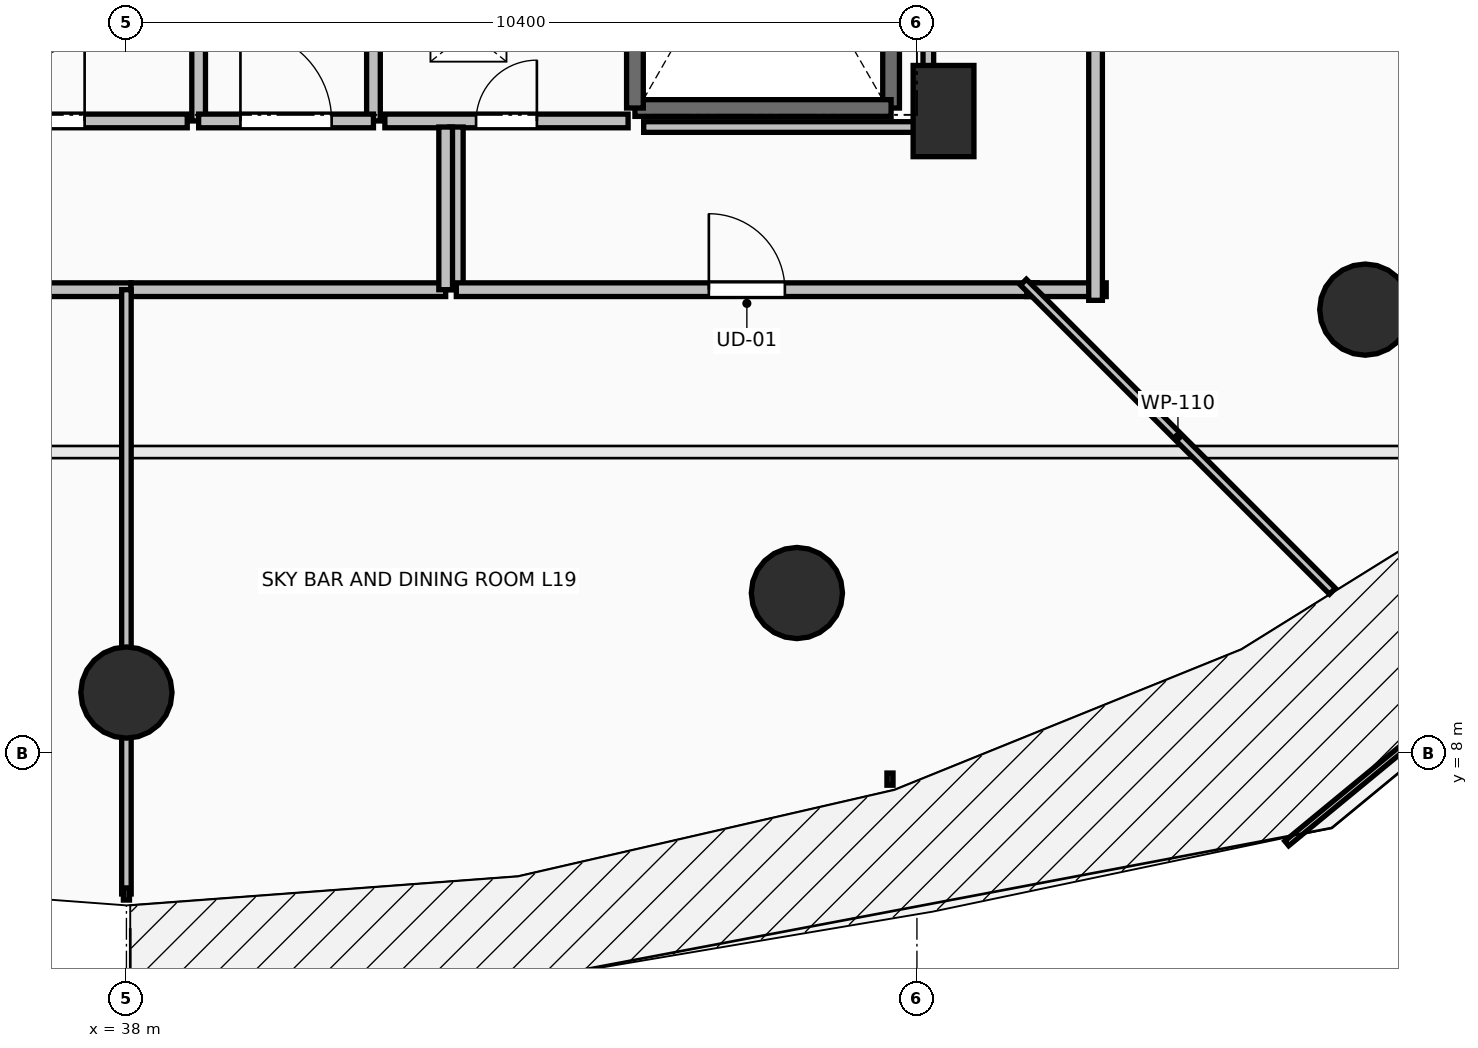
"""IFC4 building model, lengths in metres.
Left out: names, types, materials, properties, quantities, classifications, styles, units other than length and angle.
Written with IfcOpenShell. Run it as: python <this file> out.ifc"""

import sys

from ifc_helpers import new_model, si_unit, direction, frame, frame_2d, origin, origin_2d, place, context, subcontext, project, spatial, rectangle, circle, extrude, element, fill, save


model = new_model("IFC4")
c1 = context("Model", 3, precision=1e-05, world=origin(), true_north=direction((0.0, 1.0)))
c2 = subcontext(c1, "Body", "Model", "MODEL_VIEW")
j1 = project(units=[si_unit("LENGTHUNIT", "METRE"), si_unit("PLANEANGLEUNIT", "RADIAN")], contexts=[c1])
p1 = place(None, origin())
s1 = spatial("IfcSite", under=j1, at=p1, CompositionType="ELEMENT")
p2 = place(p1, origin())
s2 = spatial("IfcBuilding", under=s1, at=p2, CompositionType="ELEMENT")
p3 = place(p2, frame((0.0, 0.0, 74.3)))
s3 = spatial("IfcBuildingStorey", under=s2, at=p3, CompositionType="ELEMENT", Elevation=74.3)
for number, where, z_axis, x_axis in (
    (1, (38.0, 8.8, 0.0), (0.0, 0.0, 1.0), (0.0, -1.0, 0.0)),
    (2, (46.821, 10.109, 0.0), (0.0, 0.0, 1.0), (0.383, -0.924, 0.0)),
    (3, (54.299, 13.838, 0.0), (0.0, 0.0, 1.0), (0.707, -0.707, 0.0)),
):
    element("IfcColumn", number, at=place(p3, frame(where, z_axis=z_axis, x_axis=x_axis)), inside=s3, PredefinedType="COLUMN", context=c2, shape_type="SweptSolid", body=[
        extrude(circle(Radius=0.6, at=origin_2d()), origin(), (0.0, 0.0, 1.0), 4.5),
    ])
p4 = place(p3, frame((48.75, 16.45, 0.0), z_axis=(0.0, 0.0, 1.0), x_axis=(1.0, 0.0, 0.0)))
e4 = element("IfcColumn", 4, at=p4, inside=s3, PredefinedType="PILASTER", context=c2, shape_type="SweptSolid", body=[
    extrude(rectangle(XDim=0.8, YDim=1.2, at=origin_2d()), origin(), (0.0, 0.0, 1.0), 4.5),
])
p5 = place(p3, frame((48.06, 23.91, 0.0), z_axis=(0.0, 0.0, 1.0), x_axis=(0.0, -1.0, 0.0)))
e5 = element("IfcWall", 5, at=p5, inside=s3, PredefinedType="SOLIDWALL", context=c2, shape_type="SweptSolid", body=[
    extrude(rectangle(XDim=7.42, YDim=0.22, at=frame_2d((3.71, 0.0))), origin(), (0.0, 0.0, 1.0), 4.24),
])
p6 = place(p3, frame((48.06, 16.49, 0.0), z_axis=(0.0, 0.0, 1.0), x_axis=(-1.0, 0.0, 0.0)))
e6 = element("IfcWall", 6, at=p6, inside=s3, PredefinedType="SOLIDWALL", context=c2, shape_type="SweptSolid", body=[
    extrude(rectangle(XDim=3.37, YDim=0.22, at=frame_2d((1.685, 0.0))), origin(), (0.0, 0.0, 1.0), 4.24),
])
p7 = place(p3, frame((44.69, 16.49, 0.0), z_axis=(0.0, 0.0, 1.0), x_axis=(0.0, 1.0, 0.0)))
e7 = element("IfcWall", 7, at=p7, inside=s3, PredefinedType="SOLIDWALL", context=c2, shape_type="SweptSolid", body=[
    extrude(rectangle(XDim=7.42, YDim=0.22, at=frame_2d((3.71, 0.0))), origin(), (0.0, 0.0, 1.0), 4.24),
])
p8 = place(p3, frame((41.25, 16.32, 0.0), z_axis=(0.0, 0.0, 1.0), x_axis=(0.0, 1.0, 0.0)))
e8 = element("IfcWall", 8, at=p8, inside=s3, PredefinedType="PARTITIONING", context=c2, shape_type="SweptSolid", body=[
    extrude(rectangle(XDim=3.985, YDim=0.18, at=frame_2d((1.992, 0.0))), origin(), (0.0, 0.0, 1.0), 4.24),
])
p9 = place(p8, frame((1.593, 0.0, 0.0)))
e9 = element("IfcOpeningElement", 9, at=p9, cuts=e8, PredefinedType="OPENING", context=c2, shape_type="SweptSolid", body=[
    extrude(rectangle(XDim=0.8, YDim=2.05, at=frame_2d((0.4, 1.025))), frame((0.0, 0.105, 0.0), z_axis=(0.0, -1.0, 0.0), x_axis=(1.0, 0.0, 0.0)), (0.0, 0.0, 1.0), 0.21),
])
p10 = place(p3, frame((38.95, 21.755, 0.0), z_axis=(0.0, 0.0, 1.0), x_axis=(0.0, -1.0, 0.0)))
e10 = element("IfcWall", 10, at=p10, inside=s3, PredefinedType="PARTITIONING", context=c2, shape_type="SweptSolid", body=[
    extrude(rectangle(XDim=5.435, YDim=0.18, at=frame_2d((2.717, 0.0))), origin(), (0.0, 0.0, 1.0), 4.24),
])
p11 = place(p10, frame((2.218, 0.0, 0.0)))
e11 = element("IfcOpeningElement", 11, at=p11, cuts=e10, PredefinedType="OPENING", context=c2, shape_type="SweptSolid", body=[
    extrude(rectangle(XDim=1.0, YDim=2.15, at=frame_2d((0.5, 1.075))), frame((0.0, 0.105, 0.0), z_axis=(0.0, -1.0, 0.0), x_axis=(1.0, 0.0, 0.0)), (0.0, 0.0, 1.0), 0.21),
])
p12 = place(p3, frame((38.95, 16.32, 0.0), z_axis=(0.0, 0.0, 1.0), x_axis=(1.0, 0.0, 0.0)))
e12 = element("IfcWall", 12, at=p12, inside=s3, PredefinedType="PARTITIONING", context=c2, shape_type="SweptSolid", body=[
    extrude(rectangle(XDim=2.3, YDim=0.18, at=frame_2d((1.15, 0.0))), origin(), (0.0, 0.0, 1.0), 4.24),
])
p13 = place(p12, frame((0.55, 0.0, 0.0)))
e13 = element("IfcOpeningElement", 13, at=p13, cuts=e12, PredefinedType="OPENING", context=c2, shape_type="SweptSolid", body=[
    extrude(rectangle(XDim=1.2, YDim=2.15, at=frame_2d((0.6, 1.075))), frame((0.0, 0.105, 0.0), z_axis=(0.0, -1.0, 0.0), x_axis=(1.0, 0.0, 0.0)), (0.0, 0.0, 1.0), 0.21),
])
p14 = place(p3, frame((41.4, 16.32, 0.0), z_axis=(0.0, 0.0, 1.0), x_axis=(1.0, 0.0, 0.0)))
e14 = element("IfcWall", 14, at=p14, inside=s3, PredefinedType="PARTITIONING", context=c2, shape_type="SweptSolid", body=[
    extrude(rectangle(XDim=3.2, YDim=0.18, at=frame_2d((1.6, 0.0))), origin(), (0.0, 0.0, 1.0), 4.24),
])
p15 = place(p14, frame((1.2, 0.0, 0.0)))
e15 = element("IfcOpeningElement", 15, at=p15, cuts=e14, PredefinedType="OPENING", context=c2, shape_type="SweptSolid", body=[
    extrude(rectangle(XDim=0.8, YDim=2.05, at=frame_2d((0.4, 1.025))), frame((0.0, 0.105, 0.0), z_axis=(0.0, -1.0, 0.0), x_axis=(1.0, 0.0, 0.0)), (0.0, 0.0, 1.0), 0.21),
])
p16 = place(p3, frame((35.1, 16.32, 0.0), z_axis=(0.0, 0.0, 1.0), x_axis=(1.0, 0.0, 0.0)))
e16 = element("IfcWall", 16, at=p16, inside=s3, PredefinedType="PARTITIONING", context=c2, shape_type="SweptSolid", body=[
    extrude(rectangle(XDim=3.7, YDim=0.18, at=frame_2d((1.85, 0.0))), origin(), (0.0, 0.0, 1.0), 4.24),
])
p17 = place(p16, frame((1.35, 0.0, 0.0)))
e17 = element("IfcOpeningElement", 17, at=p17, cuts=e16, PredefinedType="OPENING", context=c2, shape_type="SweptSolid", body=[
    extrude(rectangle(XDim=1.0, YDim=2.15, at=frame_2d((0.5, 1.075))), frame((0.0, 0.105, 0.0), z_axis=(0.0, -1.0, 0.0), x_axis=(1.0, 0.0, 0.0)), (0.0, 0.0, 1.0), 0.21),
])
p18 = place(p3, frame((25.25, 14.1, 0.0), z_axis=(0.0, 0.0, 1.0), x_axis=(1.0, 0.0, 0.0)))
e18 = element("IfcWall", 18, at=p18, inside=s3, PredefinedType="PARTITIONING", context=c2, shape_type="SweptSolid", body=[
    extrude(rectangle(XDim=12.81, YDim=0.18, at=frame_2d((6.405, 0.0))), origin(), (0.0, 0.0, 1.0), 3.432),
])
p19 = place(p18, frame((5.905, 0.0, 0.0)))
e19 = element("IfcOpeningElement", 19, at=p19, cuts=e18, PredefinedType="OPENING", context=c2, shape_type="SweptSolid", body=[
    extrude(rectangle(XDim=1.0, YDim=2.15, at=frame_2d((0.5, 1.075))), frame((0.0, 0.105, 0.0), z_axis=(0.0, -1.0, 0.0), x_axis=(1.0, 0.0, 0.0)), (0.0, 0.0, 1.0), 0.21),
])
p20 = place(p3, frame((42.34, 16.24, 0.0), z_axis=(0.0, 0.0, 1.0), x_axis=(0.0, -1.0, 0.0)))
e20 = element("IfcWall", 20, at=p20, inside=s3, PredefinedType="PARTITIONING", context=c2, shape_type="SweptSolid", body=[
    extrude(rectangle(XDim=2.14, YDim=0.18, at=frame_2d((1.07, 0.0))), origin(), (0.0, 0.0, 1.0), 3.922),
])
p21 = place(p3, frame((42.34, 14.1, 0.0), z_axis=(0.0, 0.0, 1.0), x_axis=(1.0, 0.0, 0.0)))
e21 = element("IfcWall", 21, at=p21, inside=s3, PredefinedType="PARTITIONING", context=c2, shape_type="SweptSolid", body=[
    extrude(rectangle(XDim=7.645, YDim=0.18, at=frame_2d((3.823, 0.0))), origin(), (0.0, 0.0, 1.0), 3.432),
])
p22 = place(p21, frame((3.323, 0.0, 0.0)))
e22 = element("IfcOpeningElement", 22, at=p22, cuts=e21, PredefinedType="OPENING", context=c2, shape_type="SweptSolid", body=[
    extrude(rectangle(XDim=1.0, YDim=2.15, at=frame_2d((0.5, 1.075))), frame((0.0, 0.105, 0.0), z_axis=(0.0, -1.0, 0.0), x_axis=(1.0, 0.0, 0.0)), (0.0, 0.0, 1.0), 0.21),
])
p23 = place(p3, frame((38.06, 14.1, 0.0), z_axis=(0.0, 0.0, 1.0), x_axis=(1.0, 0.0, 0.0)))
e23 = element("IfcWall", 23, at=p23, inside=s3, PredefinedType="PARTITIONING", context=c2, shape_type="SweptSolid", body=[
    extrude(rectangle(XDim=4.14, YDim=0.18, at=frame_2d((2.07, 0.0))), origin(), (0.0, 0.0, 1.0), 3.922),
])
p24 = place(p3, frame((42.2, 14.1, 0.0), z_axis=(0.0, 0.0, 1.0), x_axis=(0.0, 1.0, 0.0)))
e24 = element("IfcWall", 24, at=p24, inside=s3, PredefinedType="PARTITIONING", context=c2, shape_type="SweptSolid", body=[
    extrude(rectangle(XDim=2.14, YDim=0.18, at=frame_2d((1.07, 0.0))), origin(), (0.0, 0.0, 1.0), 3.922),
])
p25 = place(p3, frame((49.845, 14.1, 0.0), z_axis=(0.0, 0.0, 1.0), x_axis=(1.0, 0.0, 0.0)))
e25 = element("IfcWall", 25, at=p25, inside=s3, PredefinedType="PARTITIONING", context=c2, shape_type="SweptSolid", body=[
    extrude(rectangle(XDim=1.045, YDim=0.18, at=frame_2d((0.522, 0.0))), origin(), (0.0, 0.0, 1.0), 3.874),
])
p26 = place(p3, frame((50.75, 13.96, 0.0), z_axis=(0.0, 0.0, 1.0), x_axis=(0.0, 1.0, 0.0)))
e26 = element("IfcWall", 26, at=p26, inside=s3, PredefinedType="PARTITIONING", context=c2, shape_type="SweptSolid", body=[
    extrude(rectangle(XDim=12.12, YDim=0.18, at=frame_2d((6.06, 0.0))), origin(), (0.0, 0.0, 1.0), 3.432),
])
p27 = place(p26, frame((5.56, 0.0, 0.0)))
e27 = element("IfcOpeningElement", 27, at=p27, cuts=e26, PredefinedType="OPENING", context=c2, shape_type="SweptSolid", body=[
    extrude(rectangle(XDim=1.0, YDim=2.15, at=frame_2d((0.5, 1.075))), frame((0.0, 0.105, 0.0), z_axis=(0.0, -1.0, 0.0), x_axis=(1.0, 0.0, 0.0)), (0.0, 0.0, 1.0), 0.21),
])
p28 = place(p3, frame((38.0, 6.15, 0.0), z_axis=(0.0, 0.0, 1.0), x_axis=(0.0, 1.0, 0.0)))
e28 = element("IfcWall", 28, at=p28, inside=s3, PredefinedType="PARTITIONING", context=c2, shape_type="SweptSolid", body=[
    extrude(rectangle(XDim=7.95, YDim=0.125, at=frame_2d((3.975, 0.0))), origin(), (0.0, 0.0, 1.0), 3.874),
])
p29 = place(p3, frame((53.867, 10.133, 0.0), z_axis=(0.0, 0.0, 1.0), x_axis=(-0.707106781187, 0.707106781187, 0.0)))
e29 = element("IfcWall", 29, at=p29, inside=s3, PredefinedType="PARTITIONING", context=c2, shape_type="SweptSolid", body=[
    extrude(rectangle(XDim=5.75, YDim=0.11, at=frame_2d((2.875, 0.0))), origin(), (0.0, 0.0, 1.0), 3.624),
])
p30 = place(p3, frame((48.55, 23.754, 0.0), z_axis=(0.0, 0.0, 1.0), x_axis=(0.0, -1.0, 0.0)))
e30 = element("IfcWall", 30, at=p30, inside=s3, PredefinedType="PARTITIONING", context=c2, shape_type="SweptSolid", body=[
    extrude(rectangle(XDim=7.514, YDim=0.14, at=frame_2d((3.757, 0.0))), origin(), (0.0, 0.0, 1.0), 3.432),
])
p31 = place(p3, frame((48.55, 16.24, 0.0), z_axis=(0.0, 0.0, 1.0), x_axis=(-1.0, 0.0, 0.0)))
e31 = element("IfcWall", 31, at=p31, inside=s3, PredefinedType="PARTITIONING", context=c2, shape_type="SweptSolid", body=[
    extrude(rectangle(XDim=3.745, YDim=0.14, at=frame_2d((1.873, 0.0))), origin(), (0.0, 0.0, 1.0), 3.432),
])
p32 = place(p13, origin())
e32 = element("IfcDoor", 32, at=p32, inside=s3, OperationType="SINGLE_SWING_LEFT", PredefinedType="DOOR", context=c2, shape_type="SweptSolid", body=[
    extrude(rectangle(XDim=1.2, YDim=2.15, at=frame_2d((0.6, 1.075))), frame((0.0, 0.025, 0.0), z_axis=(0.0, -1.0, 0.0), x_axis=(1.0, 0.0, 0.0)), (0.0, 0.0, 1.0), 0.05),
])
fill(e13, e32)
p33 = place(p15, origin())
e33 = element("IfcDoor", 33, at=p33, inside=s3, OperationType="SINGLE_SWING_RIGHT", PredefinedType="DOOR", context=c2, shape_type="SweptSolid", body=[
    extrude(rectangle(XDim=0.8, YDim=2.05, at=frame_2d((0.4, 1.025))), frame((0.0, 0.025, 0.0), z_axis=(0.0, -1.0, 0.0), x_axis=(1.0, 0.0, 0.0)), (0.0, 0.0, 1.0), 0.05),
])
fill(e15, e33)
p34 = place(p17, origin())
e34 = element("IfcDoor", 34, at=p34, inside=s3, OperationType="SINGLE_SWING_RIGHT", PredefinedType="DOOR", context=c2, shape_type="SweptSolid", body=[
    extrude(rectangle(XDim=1.0, YDim=2.15, at=frame_2d((0.5, 1.075))), frame((0.0, 0.025, 0.0), z_axis=(0.0, -1.0, 0.0), x_axis=(1.0, 0.0, 0.0)), (0.0, 0.0, 1.0), 0.05),
])
fill(e17, e34)
p35 = place(p22, origin())
e35 = element("IfcDoor", 35, at=p35, inside=s3, OperationType="SINGLE_SWING_LEFT", PredefinedType="DOOR", context=c2, shape_type="SweptSolid", body=[
    extrude(rectangle(XDim=1.0, YDim=2.15, at=frame_2d((0.5, 1.075))), frame((0.0, 0.025, 0.0), z_axis=(0.0, -1.0, 0.0), x_axis=(1.0, 0.0, 0.0)), (0.0, 0.0, 1.0), 0.05),
])
fill(e22, e35)
save(model, sys.argv[1])
